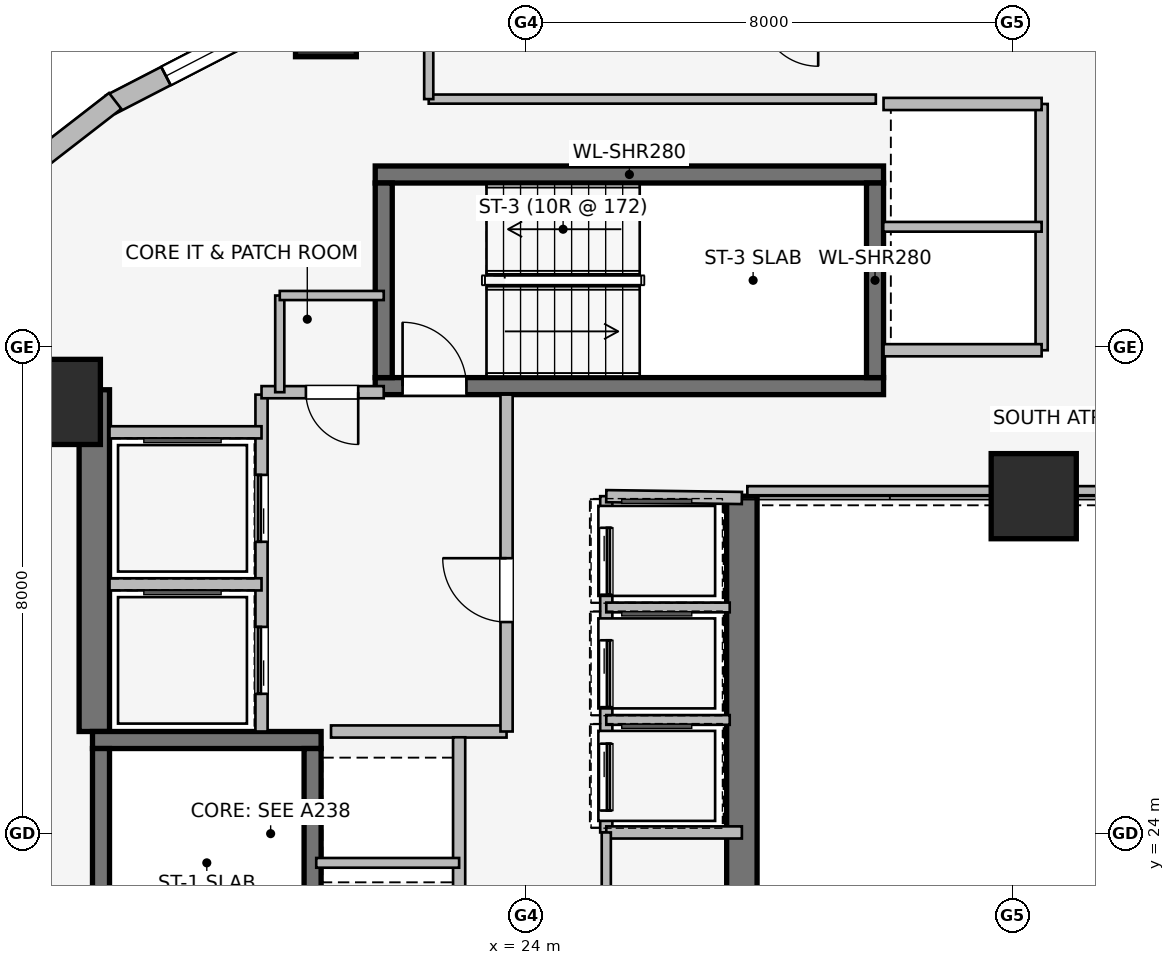
"""IFC4 building model, lengths in metres.
Left out: names, types, materials, properties, quantities, classifications, styles, units other than length and angle.
Written with IfcOpenShell. Run it as: python <this file> out.ifc"""

import sys

from ifc_helpers import new_model, si_unit, direction, frame, frame_2d, origin, origin_2d, place, context, subcontext, project, spatial, rectangle, extrude, element, fill, save


model = new_model("IFC4")
c1 = context("Model", 3, precision=1e-05, world=origin(), true_north=direction((0.0, 1.0)))
c2 = subcontext(c1, "Body", "Model", "MODEL_VIEW")
j1 = project(units=[si_unit("LENGTHUNIT", "METRE"), si_unit("PLANEANGLEUNIT", "RADIAN")], contexts=[c1])
p1 = place(None, origin())
s1 = spatial("IfcSite", under=j1, at=p1, CompositionType="ELEMENT")
p2 = place(p1, origin())
s2 = spatial("IfcBuilding", under=s1, at=p2, CompositionType="ELEMENT")
p3 = place(p2, frame((0.0, 0.0, 136.05)))
s3 = spatial("IfcBuildingStorey", under=s2, at=p3, CompositionType="ELEMENT", Elevation=136.05)
p4 = place(p3, frame((16.9, 25.68, 0.0), z_axis=(0.0, 0.0, 1.0), x_axis=(0.0, 1.0, 0.0)))
e1 = element("IfcWall", 1, at=p4, inside=s3, PredefinedType="SHEAR", context=c2, shape_type="SweptSolid", body=[
    extrude(rectangle(XDim=5.62, YDim=0.5, at=frame_2d((2.81, 0.0))), origin(), (0.0, 0.0, 1.0), 3.45),
])
p5 = place(p3, frame((27.55, 29.55, 0.0), z_axis=(0.0, 0.0, 1.0), x_axis=(0.0, -1.0, 0.0)))
e2 = element("IfcWall", 2, at=p5, inside=s3, PredefinedType="SHEAR", context=c2, shape_type="SweptSolid", body=[
    extrude(rectangle(XDim=11.25, YDim=0.5, at=frame_2d((5.625, 0.0))), origin(), (0.0, 0.0, 1.0), 3.45),
])
p6 = place(p3, frame((20.63, 25.54, 0.0), z_axis=(0.0, 0.0, 1.0), x_axis=(-1.0, 0.0, 0.0)))
e3 = element("IfcWall", 3, at=p6, inside=s3, PredefinedType="SHEAR", context=c2, shape_type="SweptSolid", body=[
    extrude(rectangle(XDim=3.76, YDim=0.28, at=frame_2d((1.88, 0.0))), origin(), (0.0, 0.0, 1.0), 3.45),
])
p7 = place(p3, frame((17.01, 25.4, 0.0), z_axis=(0.0, 0.0, 1.0), x_axis=(0.0, -1.0, 0.0)))
e4 = element("IfcWall", 4, at=p7, inside=s3, PredefinedType="SHEAR", context=c2, shape_type="SweptSolid", body=[
    extrude(rectangle(XDim=7.8, YDim=0.28, at=frame_2d((3.9, 0.0))), origin(), (0.0, 0.0, 1.0), 3.45),
])
p8 = place(p3, frame((20.49, 17.6, 0.0), z_axis=(0.0, 0.0, 1.0), x_axis=(0.0, 1.0, 0.0)))
e5 = element("IfcWall", 5, at=p8, inside=s3, PredefinedType="SHEAR", context=c2, shape_type="SweptSolid", body=[
    extrude(rectangle(XDim=7.8, YDim=0.28, at=frame_2d((3.9, 0.0))), origin(), (0.0, 0.0, 1.0), 3.45),
])
p9 = place(p8, frame((0.44, 0.0, 0.0)))
e6 = element("IfcOpeningElement", 6, at=p9, cuts=e5, PredefinedType="OPENING", context=c2, shape_type="SweptSolid", body=[
    extrude(rectangle(XDim=1.05, YDim=2.0, at=frame_2d((0.525, 1.0))), frame((0.0, 0.15, 0.0), z_axis=(0.0, -1.0, 0.0), x_axis=(1.0, 0.0, 0.0)), (0.0, 0.0, 1.0), 0.3),
])
p10 = place(p3, frame((21.52, 31.36, 0.0), z_axis=(0.0, 0.0, 1.0), x_axis=(1.0, 0.0, 0.0)))
e7 = element("IfcWall", 7, at=p10, inside=s3, PredefinedType="SHEAR", context=c2, shape_type="SweptSolid", body=[
    extrude(rectangle(XDim=8.36, YDim=0.28, at=frame_2d((4.18, 0.0))), origin(), (0.0, 0.0, 1.0), 3.45),
])
p11 = place(p10, frame((0.45, 0.0, 0.0)))
e8 = element("IfcOpeningElement", 8, at=p11, cuts=e7, PredefinedType="OPENING", context=c2, shape_type="SweptSolid", body=[
    extrude(rectangle(XDim=1.05, YDim=2.0, at=frame_2d((0.525, 1.0))), frame((0.0, 0.15, 0.0), z_axis=(0.0, -1.0, 0.0), x_axis=(1.0, 0.0, 0.0)), (0.0, 0.0, 1.0), 0.3),
])
p12 = place(p3, frame((29.88, 34.84, 0.0), z_axis=(0.0, 0.0, 1.0), x_axis=(-1.0, 0.0, 0.0)))
e9 = element("IfcWall", 9, at=p12, inside=s3, PredefinedType="SHEAR", context=c2, shape_type="SweptSolid", body=[
    extrude(rectangle(XDim=8.36, YDim=0.28, at=frame_2d((4.18, 0.0))), origin(), (0.0, 0.0, 1.0), 3.45),
])
for number, where, z_axis, x_axis in (
    (10, (21.66, 34.7, 0.0), (0.0, 0.0, 1.0), (0.0, -1.0, 0.0)),
    (11, (29.74, 31.5, 0.0), (0.0, 0.0, 1.0), (0.0, 1.0, 0.0)),
):
    element("IfcWall", number, at=place(p3, frame(where, z_axis=z_axis, x_axis=x_axis)), inside=s3, PredefinedType="SHEAR", context=c2, shape_type="SweptSolid", body=[
        extrude(rectangle(XDim=3.2, YDim=0.28, at=frame_2d((1.6, 0.0))), origin(), (0.0, 0.0, 1.0), 3.45),
    ])
for number, where, z_axis, x_axis in (
    (12, (16.3, 31.1, 0.0), (0.0, 0.0, 1.0), (1.0, 0.0, 0.0)),
    (13, (32.35, 29.55, 0.0), (0.0, 0.0, 1.0), (1.0, 0.0, 0.0)),
):
    element("IfcColumn", number, at=place(p3, frame(where, z_axis=z_axis, x_axis=x_axis)), inside=s3, PredefinedType="COLUMN", context=c2, shape_type="SweptSolid", body=[
        extrude(rectangle(XDim=1.4, YDim=1.4, at=origin_2d()), origin(), (0.0, 0.0, 1.0), 3.45),
    ])
p13 = place(p3, frame((20.709, 37.277, 0.0), z_axis=(0.0, 0.0, 1.0), x_axis=(1.0, 0.0, 0.0)))
e14 = element("IfcColumn", 14, at=p13, inside=s3, PredefinedType="COLUMN", context=c2, shape_type="SweptSolid", body=[
    extrude(rectangle(XDim=1.0, YDim=1.0, at=origin_2d()), origin(), (0.0, 0.0, 1.0), 3.45),
])
p14 = place(p3, frame((17.169, 35.99, 0.0), z_axis=(0.0, 0.0, 1.0), x_axis=(0.888613612362, 0.458656568606, 0.0)))
e15 = element("IfcWall", 15, at=p14, inside=s3, PredefinedType="STANDARD", context=c2, shape_type="SweptSolid", body=[
    extrude(rectangle(XDim=18.681, YDim=0.34, at=frame_2d((9.34, 0.0))), origin(), (0.0, 0.0, 1.0), 3.16),
])
p15 = place(p14, frame((1.023, 0.0, 0.75)))
e16 = element("IfcOpeningElement", 16, at=p15, cuts=e15, PredefinedType="OPENING", context=c2, shape_type="SweptSolid", body=[
    extrude(rectangle(XDim=1.6, YDim=1.55, at=frame_2d((0.8, 0.775))), frame((0.0, 0.18, 0.0), z_axis=(0.0, -1.0, 0.0), x_axis=(1.0, 0.0, 0.0)), (0.0, 0.0, 1.0), 0.36),
])
p16 = place(p14, frame((4.981, 0.0, 0.75)))
e17 = element("IfcOpeningElement", 17, at=p16, cuts=e15, PredefinedType="OPENING", context=c2, shape_type="SweptSolid", body=[
    extrude(rectangle(XDim=2.1, YDim=1.5, at=frame_2d((1.05, 0.75))), frame((0.0, 0.18, 0.0), z_axis=(0.0, -1.0, 0.0), x_axis=(1.0, 0.0, 0.0)), (0.0, 0.0, 1.0), 0.36),
])
p17 = place(p14, frame((8.29, 0.0, 0.75)))
e18 = element("IfcOpeningElement", 18, at=p17, cuts=e15, PredefinedType="OPENING", context=c2, shape_type="SweptSolid", body=[
    extrude(rectangle(XDim=2.1, YDim=1.5, at=frame_2d((1.05, 0.75))), frame((0.0, 0.18, 0.0), z_axis=(0.0, -1.0, 0.0), x_axis=(1.0, 0.0, 0.0)), (0.0, 0.0, 1.0), 0.36),
])
p18 = place(p14, frame((11.6, 0.0, 0.75)))
e19 = element("IfcOpeningElement", 19, at=p18, cuts=e15, PredefinedType="OPENING", context=c2, shape_type="SweptSolid", body=[
    extrude(rectangle(XDim=2.1, YDim=1.5, at=frame_2d((1.05, 0.75))), frame((0.0, 0.18, 0.0), z_axis=(0.0, -1.0, 0.0), x_axis=(1.0, 0.0, 0.0)), (0.0, 0.0, 1.0), 0.36),
])
p19 = place(p14, frame((16.058, 0.0, 0.75)))
e20 = element("IfcOpeningElement", 20, at=p19, cuts=e15, PredefinedType="OPENING", context=c2, shape_type="SweptSolid", body=[
    extrude(rectangle(XDim=1.6, YDim=1.55, at=frame_2d((0.8, 0.775))), frame((0.0, 0.18, 0.0), z_axis=(0.0, -1.0, 0.0), x_axis=(1.0, 0.0, 0.0)), (0.0, 0.0, 1.0), 0.36),
])
p20 = place(p3, frame((15.918, 35.024, 0.0), z_axis=(0.0, 0.0, 1.0), x_axis=(0.790621329885, 0.612305408053, 0.0)))
e21 = element("IfcWall", 21, at=p20, inside=s3, PredefinedType="STANDARD", context=c2, shape_type="SweptSolid", body=[
    extrude(rectangle(XDim=1.676, YDim=0.33, at=frame_2d((0.838, 0.0))), origin(), (0.0, 0.0, 1.0), 3.16),
])
p21 = place(p3, frame((19.65, 25.68, 0.0), z_axis=(0.0, 0.0, 1.0), x_axis=(0.0, 1.0, 0.0)))
e22 = element("IfcWall", 22, at=p21, inside=s3, PredefinedType="PARTITIONING", context=c2, shape_type="SweptSolid", body=[
    extrude(rectangle(XDim=5.54, YDim=0.2, at=frame_2d((2.77, 0.0))), origin(), (0.0, 0.0, 1.0), 3.16),
])
p22 = place(p21, frame((0.62, 0.0, 0.0)))
e23 = element("IfcOpeningElement", 23, at=p22, cuts=e22, PredefinedType="OPENING", context=c2, shape_type="SweptSolid", body=[
    extrude(rectangle(XDim=1.1, YDim=2.2, at=frame_2d((0.55, 1.1))), frame((0.0, 0.11, 0.0), z_axis=(0.0, -1.0, 0.0), x_axis=(1.0, 0.0, 0.0)), (0.0, 0.0, 1.0), 0.22),
])
p23 = place(p21, frame((3.12, 0.0, 0.0)))
e24 = element("IfcOpeningElement", 24, at=p23, cuts=e22, PredefinedType="OPENING", context=c2, shape_type="SweptSolid", body=[
    extrude(rectangle(XDim=1.1, YDim=2.2, at=frame_2d((0.55, 1.1))), frame((0.0, 0.11, 0.0), z_axis=(0.0, -1.0, 0.0), x_axis=(1.0, 0.0, 0.0)), (0.0, 0.0, 1.0), 0.22),
])
p24 = place(p3, frame((20.793, 25.68, 0.0), z_axis=(0.0, 0.0, 1.0), x_axis=(1.0, 0.0, 0.0)))
e25 = element("IfcWall", 25, at=p24, inside=s3, PredefinedType="PARTITIONING", context=c2, shape_type="SweptSolid", body=[
    extrude(rectangle(XDim=2.887, YDim=0.2, at=frame_2d((1.443, 0.0))), origin(), (0.0, 0.0, 1.0), 3.16),
])
p25 = place(p3, frame((23.68, 25.68, 0.0), z_axis=(0.0, 0.0, 1.0), x_axis=(0.0, 1.0, 0.0)))
e26 = element("IfcWall", 26, at=p25, inside=s3, PredefinedType="PARTITIONING", context=c2, shape_type="SweptSolid", body=[
    extrude(rectangle(XDim=5.54, YDim=0.2, at=frame_2d((2.77, 0.0))), origin(), (0.0, 0.0, 1.0), 3.16),
])
p26 = place(p25, frame((1.8, 0.0, 0.0)))
e27 = element("IfcOpeningElement", 27, at=p26, cuts=e26, PredefinedType="OPENING", context=c2, shape_type="SweptSolid", body=[
    extrude(rectangle(XDim=1.05, YDim=2.0, at=frame_2d((0.525, 1.0))), frame((0.0, 0.11, 0.0), z_axis=(0.0, -1.0, 0.0), x_axis=(1.0, 0.0, 0.0)), (0.0, 0.0, 1.0), 0.22),
])
p27 = place(p3, frame((21.66, 31.26, 0.0), z_axis=(0.0, 0.0, 1.0), x_axis=(-1.0, 0.0, 0.0)))
e28 = element("IfcWall", 28, at=p27, inside=s3, PredefinedType="PARTITIONING", context=c2, shape_type="SweptSolid", body=[
    extrude(rectangle(XDim=2.01, YDim=0.2, at=frame_2d((1.005, 0.0))), origin(), (0.0, 0.0, 1.0), 3.16),
])
p28 = place(p27, frame((0.42, 0.0, 0.0)))
e29 = element("IfcOpeningElement", 29, at=p28, cuts=e28, PredefinedType="OPENING", context=c2, shape_type="SweptSolid", body=[
    extrude(rectangle(XDim=0.86, YDim=2.0, at=frame_2d((0.43, 1.0))), frame((0.0, 0.11, 0.0), z_axis=(0.0, -1.0, 0.0), x_axis=(1.0, 0.0, 0.0)), (0.0, 0.0, 1.0), 0.22),
])
p29 = place(p3, frame((17.15, 28.1, 0.0), z_axis=(0.0, 0.0, 1.0), x_axis=(1.0, 0.0, 0.0)))
e30 = element("IfcWall", 30, at=p29, inside=s3, PredefinedType="PARTITIONING", context=c2, shape_type="SweptSolid", body=[
    extrude(rectangle(XDim=2.5, YDim=0.2, at=frame_2d((1.25, 0.0))), origin(), (0.0, 0.0, 1.0), 3.16),
])
p30 = place(p3, frame((19.65, 30.6, 0.0), z_axis=(0.0, 0.0, 1.0), x_axis=(-1.0, 0.0, 0.0)))
e31 = element("IfcWall", 31, at=p30, inside=s3, PredefinedType="PARTITIONING", context=c2, shape_type="SweptSolid", body=[
    extrude(rectangle(XDim=2.5, YDim=0.2, at=frame_2d((1.25, 0.0))), origin(), (0.0, 0.0, 1.0), 2.06),
])
p31 = place(p3, frame((32.48, 31.95, 0.0), z_axis=(0.0, 0.0, 1.0), x_axis=(0.0, 1.0, 0.0)))
e32 = element("IfcWall", 32, at=p31, inside=s3, PredefinedType="PARTITIONING", context=c2, shape_type="SweptSolid", body=[
    extrude(rectangle(XDim=4.05, YDim=0.2, at=frame_2d((2.025, 0.0))), origin(), (0.0, 0.0, 1.0), 3.16),
])
for number, where, z_axis, x_axis in (
    (33, (29.88, 36.0, 0.0), (0.0, 0.0, 1.0), (1.0, 0.0, 0.0)),
    (34, (32.48, 31.95, 0.0), (0.0, 0.0, 1.0), (-1.0, 0.0, 0.0)),
):
    element("IfcWall", number, at=place(p3, frame(where, z_axis=z_axis, x_axis=x_axis)), inside=s3, PredefinedType="PARTITIONING", context=c2, shape_type="SweptSolid", body=[
        extrude(rectangle(XDim=2.6, YDim=0.2, at=frame_2d((1.3, 0.0))), origin(), (0.0, 0.0, 1.0), 3.16),
    ])
p32 = place(p3, frame((29.875, 33.98, 0.0), z_axis=(0.0, 0.0, 1.0), x_axis=(1.0, 0.0, 0.0)))
e35 = element("IfcWall", 35, at=p32, inside=s3, PredefinedType="PARTITIONING", context=c2, shape_type="SweptSolid", body=[
    extrude(rectangle(XDim=2.605, YDim=0.16, at=frame_2d((1.302, 0.0))), origin(), (0.0, 0.0, 1.0), 3.16),
])
p33 = place(p3, frame((22.9, 19.5, 0.0), z_axis=(0.0, 0.0, 1.0), x_axis=(0.0, 1.0, 0.0)))
e36 = element("IfcWall", 36, at=p33, inside=s3, PredefinedType="PARTITIONING", context=c2, shape_type="SweptSolid", body=[
    extrude(rectangle(XDim=6.085, YDim=0.2, at=frame_2d((3.042, 0.0))), origin(), (0.0, 0.0, 1.0), 3.16),
])
p34 = place(p3, frame((20.55, 23.52, 0.0), z_axis=(0.0, 0.0, 1.0), x_axis=(1.0, 0.0, 0.0)))
e37 = element("IfcWall", 37, at=p34, inside=s3, PredefinedType="PARTITIONING", context=c2, shape_type="SweptSolid", body=[
    extrude(rectangle(XDim=2.35, YDim=0.16, at=frame_2d((1.175, 0.0))), origin(), (0.0, 0.0, 1.0), 3.16),
])
p35 = place(p3, frame((25.32, 29.55, 0.0), z_axis=(0.0, 0.0, 1.0), x_axis=(0.0, -1.0, 0.0)))
e38 = element("IfcWall", 38, at=p35, inside=s3, PredefinedType="PARTITIONING", context=c2, shape_type="SweptSolid", body=[
    extrude(rectangle(XDim=5.53, YDim=0.2, at=frame_2d((2.765, 0.0))), origin(), (0.0, 0.0, 1.0), 3.16),
])
p36 = place(p35, frame((0.52, 0.0, 0.0)))
e39 = element("IfcOpeningElement", 39, at=p36, cuts=e38, PredefinedType="OPENING", context=c2, shape_type="SweptSolid", body=[
    extrude(rectangle(XDim=1.1, YDim=2.2, at=frame_2d((0.55, 1.1))), frame((0.0, 0.11, 0.0), z_axis=(0.0, -1.0, 0.0), x_axis=(1.0, 0.0, 0.0)), (0.0, 0.0, 1.0), 0.22),
])
p37 = place(p35, frame((2.37, 0.0, 0.0)))
e40 = element("IfcOpeningElement", 40, at=p37, cuts=e38, PredefinedType="OPENING", context=c2, shape_type="SweptSolid", body=[
    extrude(rectangle(XDim=1.1, YDim=2.2, at=frame_2d((0.55, 1.1))), frame((0.0, 0.11, 0.0), z_axis=(0.0, -1.0, 0.0), x_axis=(1.0, 0.0, 0.0)), (0.0, 0.0, 1.0), 0.22),
])
p38 = place(p35, frame((4.07, 0.0, 0.0)))
e41 = element("IfcOpeningElement", 41, at=p38, cuts=e38, PredefinedType="OPENING", context=c2, shape_type="SweptSolid", body=[
    extrude(rectangle(XDim=1.1, YDim=2.2, at=frame_2d((0.55, 1.1))), frame((0.0, 0.11, 0.0), z_axis=(0.0, -1.0, 0.0), x_axis=(1.0, 0.0, 0.0)), (0.0, 0.0, 1.0), 0.22),
])
p39 = place(p3, frame((27.55, 29.52, 0.0), z_axis=(0.0, 0.0, 1.0), x_axis=(-0.999909343457, 0.013464949556, 0.0)))
e42 = element("IfcWall", 42, at=p39, inside=s3, PredefinedType="PARTITIONING", context=c2, shape_type="SweptSolid", body=[
    extrude(rectangle(XDim=2.23, YDim=0.2, at=frame_2d((1.115, 0.0))), origin(), (0.0, 0.0, 1.0), 2.06),
])
p40 = place(p3, frame((25.32, 24.02, 0.0), z_axis=(0.0, 0.0, 1.0), x_axis=(1.0, 0.0, 0.0)))
e43 = element("IfcWall", 43, at=p40, inside=s3, PredefinedType="PARTITIONING", context=c2, shape_type="SweptSolid", body=[
    extrude(rectangle(XDim=2.23, YDim=0.2, at=frame_2d((1.115, 0.0))), origin(), (0.0, 0.0, 1.0), 3.16),
])
for number, where, z_axis, x_axis in (
    (44, (25.32, 25.87, 0.0), (0.0, 0.0, 1.0), (1.0, 0.0, 0.0)),
    (45, (25.32, 27.72, 0.0), (0.0, 0.0, 1.0), (1.0, 0.0, 0.0)),
):
    element("IfcWall", number, at=place(p3, frame(where, z_axis=z_axis, x_axis=x_axis)), inside=s3, PredefinedType="PARTITIONING", context=c2, shape_type="SweptSolid", body=[
        extrude(rectangle(XDim=2.03, YDim=0.16, at=frame_2d((1.015, 0.0))), origin(), (0.0, 0.0, 1.0), 3.16),
    ])
p41 = place(p3, frame((25.32, 24.02, 0.0), z_axis=(0.0, 0.0, 1.0), x_axis=(0.0, -1.0, 0.0)))
e46 = element("IfcWall", 46, at=p41, inside=s3, PredefinedType="PARTITIONING", context=c2, shape_type="SweptSolid", body=[
    extrude(rectangle(XDim=5.66, YDim=0.15, at=frame_2d((2.83, 0.0))), origin(), (0.0, 0.0, 1.0), 3.16),
])
p42 = place(p41, frame((2.2, 0.0, 0.0)))
e47 = element("IfcOpeningElement", 47, at=p42, cuts=e46, PredefinedType="OPENING", context=c2, shape_type="SweptSolid", body=[
    extrude(rectangle(XDim=0.9, YDim=2.0, at=frame_2d((0.45, 1.0))), frame((0.0, 0.085, 0.0), z_axis=(0.0, -1.0, 0.0), x_axis=(1.0, 0.0, 0.0)), (0.0, 0.0, 1.0), 0.17),
])
p43 = place(p3, frame((19.95, 32.85, 0.0), z_axis=(0.0, 0.0, 1.0), x_axis=(0.0, -1.0, 0.0)))
e48 = element("IfcWall", 48, at=p43, inside=s3, PredefinedType="PARTITIONING", context=c2, shape_type="SweptSolid", body=[
    extrude(rectangle(XDim=1.59, YDim=0.15, at=frame_2d((0.795, 0.0))), origin(), (0.0, 0.0, 1.0), 3.16),
])
p44 = place(p3, frame((21.66, 32.85, 0.0), z_axis=(0.0, 0.0, 1.0), x_axis=(-1.0, 0.0, 0.0)))
e49 = element("IfcWall", 49, at=p44, inside=s3, PredefinedType="PARTITIONING", context=c2, shape_type="SweptSolid", body=[
    extrude(rectangle(XDim=1.71, YDim=0.15, at=frame_2d((0.855, 0.0))), origin(), (0.0, 0.0, 1.0), 3.16),
])
p45 = place(p3, frame((39.84, 29.64, 0.0), z_axis=(0.0, 0.0, 1.0), x_axis=(-1.0, 0.0, 0.0)))
e50 = element("IfcWall", 50, at=p45, inside=s3, PredefinedType="PARTITIONING", context=c2, shape_type="SweptSolid", body=[
    extrude(rectangle(XDim=12.2, YDim=0.15, at=frame_2d((6.1, 0.0))), origin(), (0.0, 0.0, 1.0), 2.301),
])
p46 = place(p3, frame((29.753, 36.08, 0.0), z_axis=(0.0, 0.0, 1.0), x_axis=(-1.0, 0.0, 0.0)))
e51 = element("IfcWall", 51, at=p46, inside=s3, PredefinedType="PARTITIONING", context=c2, shape_type="SweptSolid", body=[
    extrude(rectangle(XDim=7.353, YDim=0.15, at=frame_2d((3.677, 0.0))), origin(), (0.0, 0.0, 1.0), 3.16),
])
p47 = place(p3, frame((22.4, 36.08, 0.0), z_axis=(0.0, 0.0, 1.0), x_axis=(0.0, 1.0, 0.0)))
e52 = element("IfcWall", 52, at=p47, inside=s3, PredefinedType="PARTITIONING", context=c2, shape_type="SweptSolid", body=[
    extrude(rectangle(XDim=1.43, YDim=0.15, at=frame_2d((0.715, 0.0))), origin(), (0.0, 0.0, 1.0), 3.16),
])
p48 = place(p15, origin())
e53 = element("IfcWindow", 53, at=p48, inside=s3, PartitioningType="SINGLE_PANEL", PredefinedType="WINDOW", context=c2, shape_type="SweptSolid", body=[
    extrude(rectangle(XDim=1.6, YDim=1.55, at=frame_2d((0.8, 0.775))), frame((0.0, 0.03, 0.0), z_axis=(0.0, -1.0, 0.0), x_axis=(1.0, 0.0, 0.0)), (0.0, 0.0, 1.0), 0.06),
])
fill(e16, e53)
p49 = place(p11, origin())
e54 = element("IfcDoor", 54, at=p49, inside=s3, OperationType="SINGLE_SWING_LEFT", PredefinedType="DOOR", context=c2, shape_type="SweptSolid", body=[
    extrude(rectangle(XDim=1.05, YDim=2.0, at=frame_2d((0.525, 1.0))), frame((0.0, 0.025, 0.0), z_axis=(0.0, -1.0, 0.0), x_axis=(1.0, 0.0, 0.0)), (0.0, 0.0, 1.0), 0.05),
])
fill(e8, e54)
p50 = place(p22, origin())
e55 = element("IfcDoor", 55, at=p50, inside=s3, OperationType="SLIDING_TO_LEFT", PredefinedType="DOOR", context=c2, shape_type="SweptSolid", body=[
    extrude(rectangle(XDim=1.1, YDim=2.2, at=frame_2d((0.55, 1.1))), frame((0.0, 0.025, 0.0), z_axis=(0.0, -1.0, 0.0), x_axis=(1.0, 0.0, 0.0)), (0.0, 0.0, 1.0), 0.05),
])
fill(e23, e55)
p51 = place(p23, origin())
e56 = element("IfcDoor", 56, at=p51, inside=s3, OperationType="SLIDING_TO_LEFT", PredefinedType="DOOR", context=c2, shape_type="SweptSolid", body=[
    extrude(rectangle(XDim=1.1, YDim=2.2, at=frame_2d((0.55, 1.1))), frame((0.0, 0.025, 0.0), z_axis=(0.0, -1.0, 0.0), x_axis=(1.0, 0.0, 0.0)), (0.0, 0.0, 1.0), 0.05),
])
fill(e24, e56)
p52 = place(p26, origin())
e57 = element("IfcDoor", 57, at=p52, inside=s3, OperationType="SINGLE_SWING_RIGHT", PredefinedType="DOOR", context=c2, shape_type="SweptSolid", body=[
    extrude(rectangle(XDim=1.05, YDim=2.0, at=frame_2d((0.525, 1.0))), frame((0.0, 0.025, 0.0), z_axis=(0.0, -1.0, 0.0), x_axis=(1.0, 0.0, 0.0)), (0.0, 0.0, 1.0), 0.05),
])
fill(e27, e57)
p53 = place(p28, origin())
e58 = element("IfcDoor", 58, at=p53, inside=s3, OperationType="SINGLE_SWING_LEFT", PredefinedType="DOOR", context=c2, shape_type="SweptSolid", body=[
    extrude(rectangle(XDim=0.86, YDim=2.0, at=frame_2d((0.43, 1.0))), frame((0.0, 0.025, 0.0), z_axis=(0.0, -1.0, 0.0), x_axis=(1.0, 0.0, 0.0)), (0.0, 0.0, 1.0), 0.05),
])
fill(e29, e58)
p54 = place(p36, origin())
e59 = element("IfcDoor", 59, at=p54, inside=s3, OperationType="SLIDING_TO_LEFT", PredefinedType="DOOR", context=c2, shape_type="SweptSolid", body=[
    extrude(rectangle(XDim=1.1, YDim=2.2, at=frame_2d((0.55, 1.1))), frame((0.0, 0.025, 0.0), z_axis=(0.0, -1.0, 0.0), x_axis=(1.0, 0.0, 0.0)), (0.0, 0.0, 1.0), 0.05),
])
fill(e39, e59)
p55 = place(p37, origin())
e60 = element("IfcDoor", 60, at=p55, inside=s3, OperationType="SLIDING_TO_LEFT", PredefinedType="DOOR", context=c2, shape_type="SweptSolid", body=[
    extrude(rectangle(XDim=1.1, YDim=2.2, at=frame_2d((0.55, 1.1))), frame((0.0, 0.025, 0.0), z_axis=(0.0, -1.0, 0.0), x_axis=(1.0, 0.0, 0.0)), (0.0, 0.0, 1.0), 0.05),
])
fill(e40, e60)
p56 = place(p38, origin())
e61 = element("IfcDoor", 61, at=p56, inside=s3, OperationType="SLIDING_TO_LEFT", PredefinedType="DOOR", context=c2, shape_type="SweptSolid", body=[
    extrude(rectangle(XDim=1.1, YDim=2.2, at=frame_2d((0.55, 1.1))), frame((0.0, 0.025, 0.0), z_axis=(0.0, -1.0, 0.0), x_axis=(1.0, 0.0, 0.0)), (0.0, 0.0, 1.0), 0.05),
])
fill(e41, e61)
save(model, sys.argv[1])
